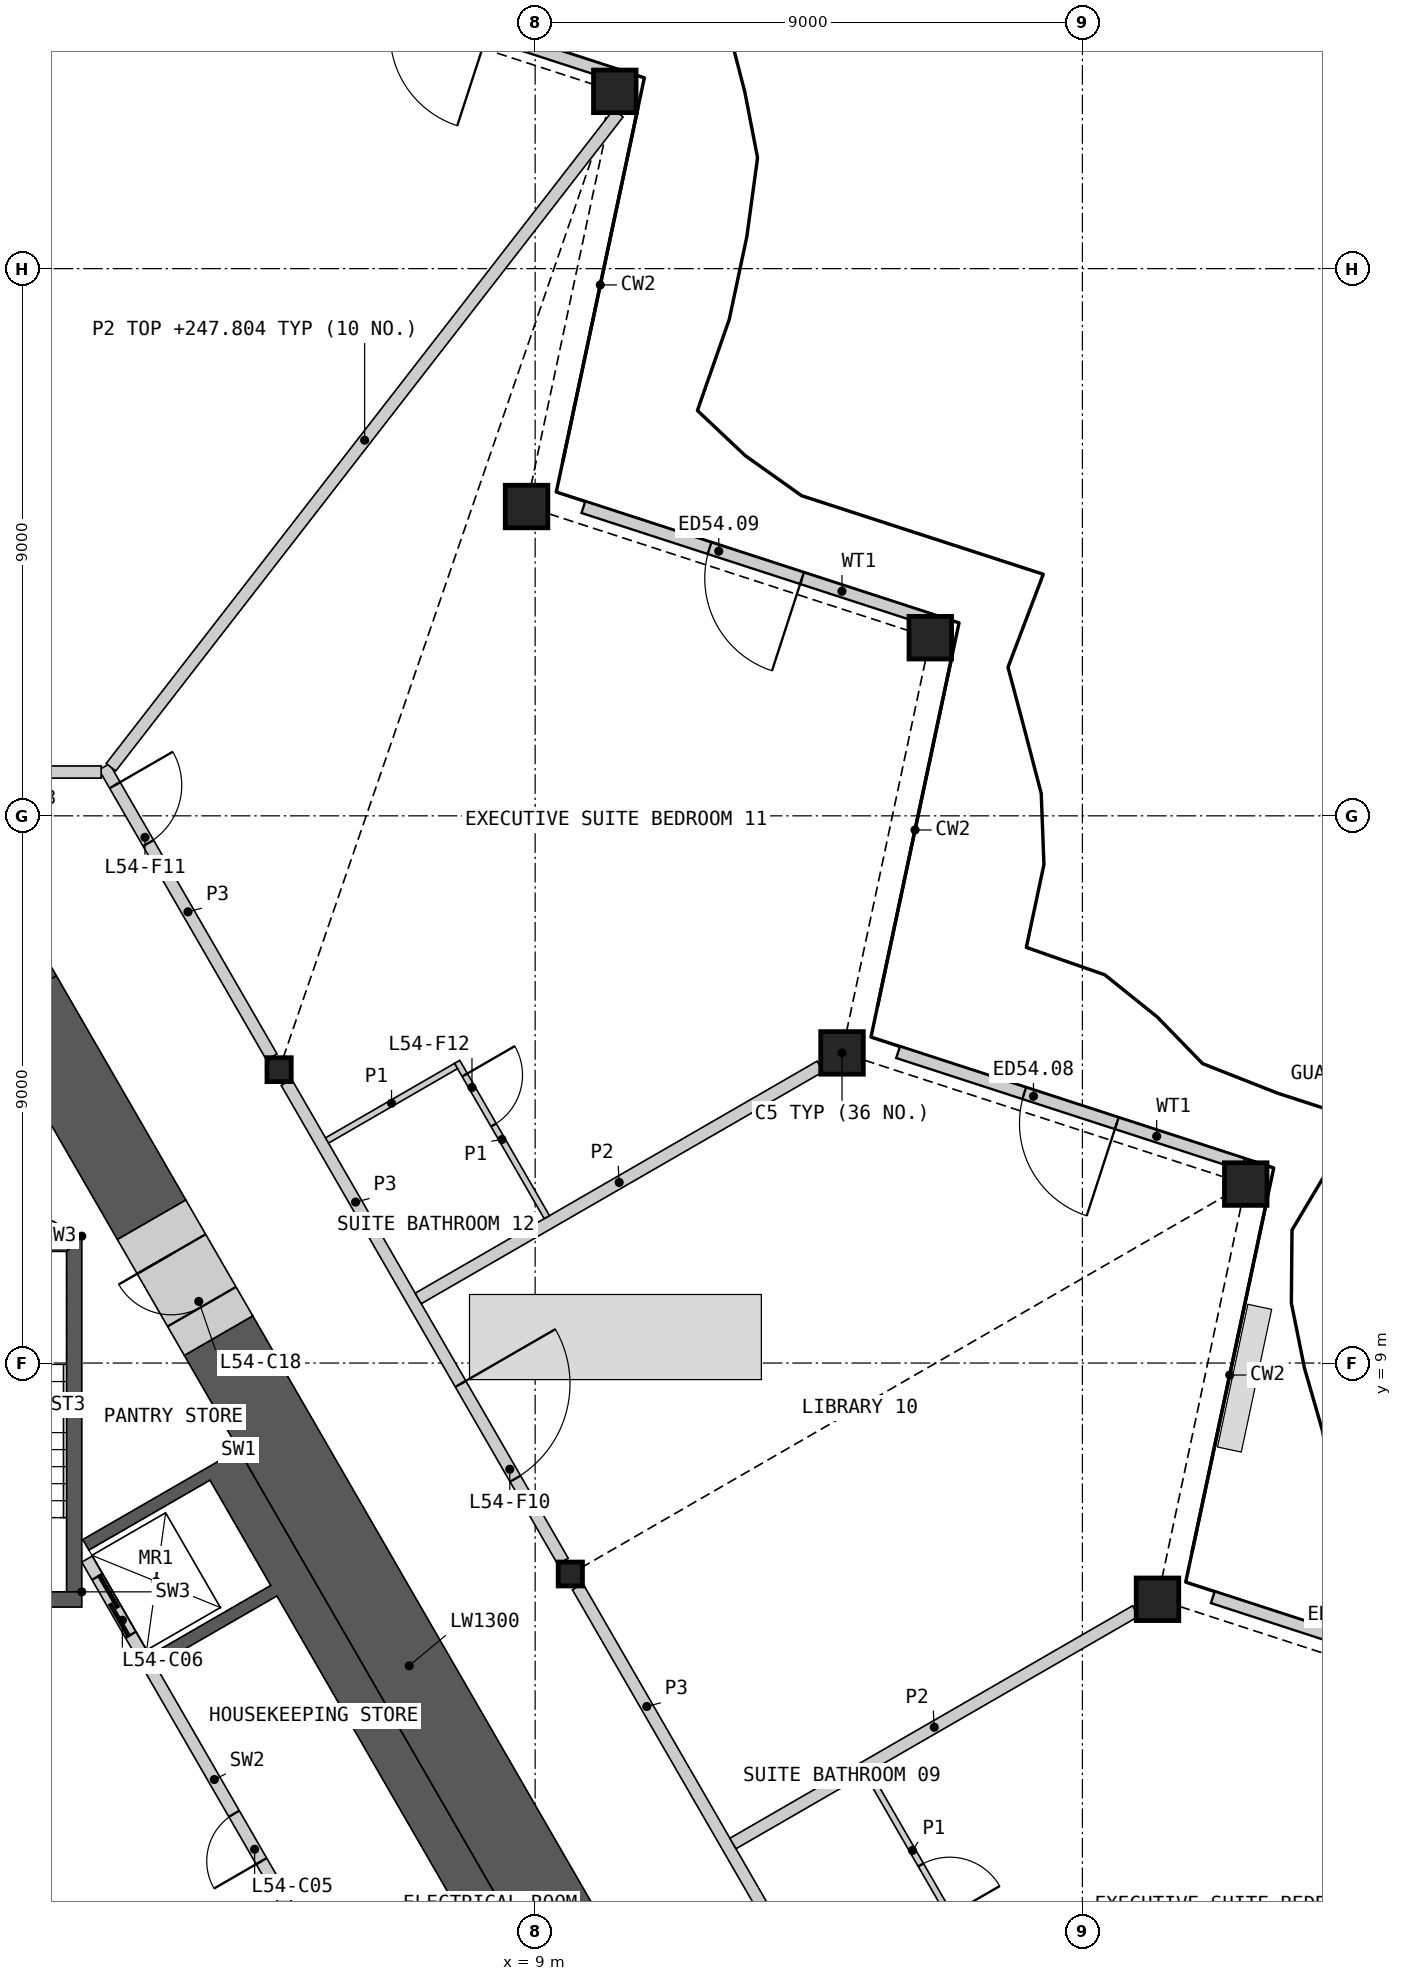
"""IFC4 building model, lengths in metres.
Left out: names, types, materials, properties, quantities, classifications, styles, units other than length and angle.
Written with IfcOpenShell. Run it as: python <this file> out.ifc"""

import sys

from ifc_helpers import new_model, si_unit, direction, frame, frame_2d, origin, origin_2d, place, context, subcontext, project, spatial, polyline, rectangle, hollow_rectangle, i_section, outline, extrude, element, fill, save


model = new_model("IFC4")
c1 = context("Model", 3, precision=1e-05, world=origin(), true_north=direction((0.0, 1.0)))
c2 = subcontext(c1, "Body", "Model", "MODEL_VIEW")
j1 = project(units=[si_unit("LENGTHUNIT", "METRE"), si_unit("PLANEANGLEUNIT", "RADIAN")], contexts=[c1])
p1 = place(None, origin())
s1 = spatial("IfcSite", under=j1, at=p1, CompositionType="ELEMENT")
p2 = place(p1, origin())
s2 = spatial("IfcBuilding", under=s1, at=p2, CompositionType="ELEMENT")
p3 = place(p2, frame((0.0, 0.0, 245.4)))
s3 = spatial("IfcBuildingStorey", under=s2, at=p3, CompositionType="ELEMENT", Elevation=245.4)
for number, where, z_axis, x_axis in (
    (1, (19.235, 5.115, 0.0), (0.0, 0.0, 1.0), (1.0, 0.0, 0.0)),
    (2, (20.687, 11.943, 0.0), (0.0, 0.0, 1.0), (1.0, 0.0, 0.0)),
    (3, (14.047, 14.101, 0.0), (0.0, 0.0, 1.0), (1.0, 0.0, 0.0)),
    (4, (15.499, 20.93, 0.0), (0.0, 0.0, 1.0), (1.0, 0.0, 0.0)),
    (5, (8.859, 23.087, 0.0), (0.0, 0.0, 1.0), (1.0, 0.0, 0.0)),
    (6, (10.31, 29.916, 0.0), (0.0, 0.0, 1.0), (1.0, 0.0, 0.0)),
):
    element("IfcColumn", number, at=place(p3, frame(where, z_axis=z_axis, x_axis=x_axis)), inside=s3, PredefinedType="COLUMN", context=c2, shape_type="SweptSolid", body=[
        extrude(hollow_rectangle(XDim=0.7, YDim=0.7, WallThickness=0.045, at=origin_2d()), origin(), (0.0, 0.0, 1.0), 3.6),
    ])
for number, where, z_axis, x_axis in (
    (7, (9.578, 5.53, 0.0), (0.0, 0.0, 1.0), (1.0, 0.0, 0.0)),
    (8, (4.789, 13.825, 0.0), (0.0, 0.0, 1.0), (1.0, 0.0, 0.0)),
):
    element("IfcColumn", number, at=place(p3, frame(where, z_axis=z_axis, x_axis=x_axis)), inside=s3, PredefinedType="COLUMN", context=c2, shape_type="SweptSolid", body=[
        extrude(i_section(OverallWidth=0.399, OverallDepth=0.393, WebThickness=0.023, FlangeThickness=0.037, at=origin_2d()), origin(), (0.0, 0.0, 1.0), 3.6),
    ])
p4 = place(p3, frame((25.815, 3.304, 0.0), z_axis=(0.0, 0.0, 1.0), x_axis=(-0.951055430656, 0.309020335608, 0.0)))
e9 = element("IfcWall", 9, at=p4, inside=s3, PredefinedType="SOLIDWALL", context=c2, shape_type="SweptSolid", body=[
    extrude(rectangle(XDim=5.962, YDim=0.2, at=frame_2d((2.981, 0.0))), origin(), (0.0, 0.0, 1.0), 2.701),
])
p5 = place(p4, frame((2.181, 0.0, 0.0)))
e10 = element("IfcOpeningElement", 10, at=p5, cuts=e9, PredefinedType="OPENING", context=c2, shape_type="SweptSolid", body=[
    extrude(rectangle(XDim=1.6, YDim=2.4, at=frame_2d((0.8, 1.2))), frame((0.0, 0.11, 0.0), z_axis=(0.0, -1.0, 0.0), x_axis=(1.0, 0.0, 0.0)), (0.0, 0.0, 1.0), 0.22),
])
p6 = place(p3, frame((20.64, 12.269, 0.0), z_axis=(0.0, 0.0, 1.0), x_axis=(-0.95104730696, 0.309045336358, 0.0)))
e11 = element("IfcWall", 11, at=p6, inside=s3, PredefinedType="SOLIDWALL", context=c2, shape_type="SweptSolid", body=[
    extrude(rectangle(XDim=5.963, YDim=0.2, at=frame_2d((2.981, 0.0))), origin(), (0.0, 0.0, 1.0), 2.701),
])
p7 = place(p6, frame((2.181, 0.0, 0.0)))
e12 = element("IfcOpeningElement", 12, at=p7, cuts=e11, PredefinedType="OPENING", context=c2, shape_type="SweptSolid", body=[
    extrude(rectangle(XDim=1.6, YDim=2.4, at=frame_2d((0.8, 1.2))), frame((0.0, 0.11, 0.0), z_axis=(0.0, -1.0, 0.0), x_axis=(1.0, 0.0, 0.0)), (0.0, 0.0, 1.0), 0.22),
])
p8 = place(p3, frame((15.464, 21.233, 0.0), z_axis=(0.0, 0.0, 1.0), x_axis=(-0.951055430656, 0.309020335608, 0.0)))
e13 = element("IfcWall", 13, at=p8, inside=s3, PredefinedType="SOLIDWALL", context=c2, shape_type="SweptSolid", body=[
    extrude(rectangle(XDim=5.962, YDim=0.2, at=frame_2d((2.981, 0.0))), origin(), (0.0, 0.0, 1.0), 2.701),
])
p9 = place(p8, frame((2.181, 0.0, 0.0)))
e14 = element("IfcOpeningElement", 14, at=p9, cuts=e13, PredefinedType="OPENING", context=c2, shape_type="SweptSolid", body=[
    extrude(rectangle(XDim=1.6, YDim=2.4, at=frame_2d((0.8, 1.2))), frame((0.0, 0.11, 0.0), z_axis=(0.0, -1.0, 0.0), x_axis=(1.0, 0.0, 0.0)), (0.0, 0.0, 1.0), 0.22),
])
p10 = place(p3, frame((10.288, 30.198, 0.0), z_axis=(0.0, 0.0, 1.0), x_axis=(-0.951055430656, 0.309020335608, 0.0)))
e15 = element("IfcWall", 15, at=p10, inside=s3, PredefinedType="SOLIDWALL", context=c2, shape_type="SweptSolid", body=[
    extrude(rectangle(XDim=5.962, YDim=0.2, at=frame_2d((2.981, 0.0))), origin(), (0.0, 0.0, 1.0), 2.701),
])
p11 = place(p10, frame((2.181, 0.0, 0.0)))
e16 = element("IfcOpeningElement", 16, at=p11, cuts=e15, PredefinedType="OPENING", context=c2, shape_type="SweptSolid", body=[
    extrude(rectangle(XDim=1.6, YDim=2.4, at=frame_2d((0.8, 1.2))), frame((0.0, 0.11, 0.0), z_axis=(0.0, -1.0, 0.0), x_axis=(1.0, 0.0, 0.0)), (0.0, 0.0, 1.0), 0.22),
])
p12 = place(p3, origin())
e17 = element("IfcWall", 17, at=p12, inside=s3, PredefinedType="SHEAR", context=c2, shape_type="SweptSolid", body=[
    extrude(outline(polyline([(4.124, 7.577), (8.624, -0.217), (8.231, -0.444), (6.061, -1.697), (5.96, -1.524), (7.952, -0.374), (4.752, 5.169), (2.76, 4.019), (2.66, 4.192), (4.652, 5.342), (3.652, 7.074), (1.66, 5.924), (1.561, 6.097), (3.731, 7.35), (4.124, 7.577)])), origin(), (0.0, 0.0, 1.0), 3.25),
])
p13 = place(p3, frame((5.817, -1.476, 0.0), z_axis=(0.0, 0.0, 1.0), x_axis=(-0.500002616675, 0.866023893041, 0.0)))
e18 = element("IfcWall", 18, at=p13, inside=s3, PredefinedType="SOLIDWALL", context=c2, shape_type="SweptSolid", body=[
    extrude(rectangle(XDim=8.373, YDim=0.2, at=frame_2d((4.187, 0.0))), origin(), (0.0, 0.0, 1.0), 3.25),
])
p14 = place(p13, frame((2.637, 0.0, 0.0)))
e19 = element("IfcOpeningElement", 19, at=p14, cuts=e18, PredefinedType="OPENING", context=c2, shape_type="SweptSolid", body=[
    extrude(rectangle(XDim=0.9, YDim=2.1, at=frame_2d((0.45, 1.05))), frame((0.0, 0.11, 0.0), z_axis=(0.0, -1.0, 0.0), x_axis=(1.0, 0.0, 0.0)), (0.0, 0.0, 1.0), 0.22),
])
p15 = place(p13, frame((6.937, 0.0, 0.0)))
e20 = element("IfcOpeningElement", 20, at=p15, cuts=e18, PredefinedType="OPENING", context=c2, shape_type="SweptSolid", body=[
    extrude(rectangle(XDim=1.1, YDim=2.1, at=frame_2d((0.55, 1.05))), frame((0.0, 0.11, 0.0), z_axis=(0.0, -1.0, 0.0), x_axis=(1.0, 0.0, 0.0)), (0.0, 0.0, 1.0), 0.22),
])
p16 = place(p3, origin())
e21 = element("IfcWall", 21, at=p16, inside=s3, PredefinedType="SHEAR", context=c2, shape_type="SweptSolid", body=[
    extrude(outline(polyline([(1.544, 5.237), (1.544, 11.087), (1.294, 10.837), (1.294, 5.237), (1.544, 5.237)])), origin(), (0.0, 0.0, 1.0), 3.25),
])
p17 = place(p3, origin())
e22 = element("IfcWall", 22, at=p17, inside=s3, PredefinedType="SHEAR", context=c2, shape_type="SweptSolid", body=[
    extrude(outline(polyline([(1.544, 11.087), (-1.544, 11.087), (-1.294, 10.837), (1.294, 10.837), (1.544, 11.087)])), origin(), (0.0, 0.0, 1.0), 3.25),
])
p18 = place(p3, frame((1.544, 5.112, 0.0), z_axis=(0.0, 0.0, 1.0), x_axis=(-1.0, 0.0, 0.0)))
e23 = element("IfcWall", 23, at=p18, inside=s3, PredefinedType="SHEAR", context=c2, shape_type="SweptSolid", body=[
    extrude(rectangle(XDim=3.088, YDim=0.25, at=frame_2d((1.544, 0.0))), origin(), (0.0, 0.0, 1.0), 3.25),
])
p19 = place(p18, frame((0.994, 0.0, 0.0)))
e24 = element("IfcOpeningElement", 24, at=p19, cuts=e23, PredefinedType="OPENING", context=c2, shape_type="SweptSolid", body=[
    extrude(rectangle(XDim=1.1, YDim=2.1, at=frame_2d((0.55, 1.05))), frame((0.0, 0.135, 0.0), z_axis=(0.0, -1.0, 0.0), x_axis=(1.0, 0.0, 0.0)), (0.0, 0.0, 1.0), 0.27),
])
p20 = place(p3, frame((-1.237, 12.578, 0.0), z_axis=(0.0, 0.0, 1.0), x_axis=(0.866045649925, -0.499964931016, 0.0)))
e25 = element("IfcWall", 25, at=p20, inside=s3, PredefinedType="PARTITIONING", context=c2, shape_type="SweptSolid", body=[
    extrude(rectangle(XDim=2.992, YDim=0.15, at=frame_2d((1.496, 0.0))), origin(), (0.0, 0.0, 1.0), 3.25),
])
p21 = place(p3, frame((10.062, -1.408, 0.0), z_axis=(0.0, 0.0, 1.0), x_axis=(-0.500000545805, 0.866025088663, 0.0)))
e26 = element("IfcWall", 26, at=p21, inside=s3, PredefinedType="SHEAR", context=c2, shape_type="SweptSolid", body=[
    extrude(rectangle(XDim=12.539, YDim=1.3, at=frame_2d((6.27, 0.0))), origin(), (0.0, 0.0, 1.0), 3.25),
])
p22 = place(p3, frame((2.693, 11.356, 0.0), z_axis=(0.0, 0.0, 1.0), x_axis=(-0.50002837164, 0.866009022791, 0.0)))
e27 = element("IfcWall", 27, at=p22, inside=s3, PredefinedType="SHEAR", context=c2, shape_type="SweptSolid", body=[
    extrude(rectangle(XDim=4.26, YDim=1.3, at=frame_2d((2.13, 0.0))), origin(), (0.0, 0.0, 1.0), 3.25),
])
p23 = place(p3, origin())
e28 = element("IfcWall", 28, at=p23, inside=s3, PredefinedType="SHEAR", context=c2, shape_type="SweptSolid", body=[
    extrude(outline(polyline([(-1.126, 15.371), (0.0, 17.321), (1.126, 15.371), (0.0, 14.72), (-1.126, 15.371)])), origin(), (0.0, 0.0, 1.0), 3.25),
])
p24 = place(p3, frame((3.793, 9.451, 0.0), z_axis=(0.0, 0.0, 1.0), x_axis=(-0.499946605688, 0.86605622881, 0.0)))
e29 = element("IfcWall", 29, at=p24, inside=s3, PredefinedType="SHEAR", context=c2, shape_type="SweptSolid", body=[
    extrude(rectangle(XDim=2.2, YDim=1.3, at=frame_2d((1.1, 0.0))), origin(), (0.0, 0.0, 1.0), 3.25),
])
p25 = place(p24, frame((0.55, 0.0, 0.0)))
e30 = element("IfcOpeningElement", 30, at=p25, cuts=e29, PredefinedType="OPENING", context=c2, shape_type="SweptSolid", body=[
    extrude(rectangle(XDim=1.0, YDim=2.1, at=frame_2d((0.5, 1.05))), frame((0.0, 0.66, 0.0), z_axis=(0.0, -1.0, 0.0), x_axis=(1.0, 0.0, 0.0)), (0.0, 0.0, 1.0), 1.32),
])
p26 = place(p3, frame((9.699, 5.321, 0.0), z_axis=(0.0, 0.0, 1.0), x_axis=(0.49998193945, -0.866035830797, 0.0)))
e31 = element("IfcWall", 31, at=p26, inside=s3, PredefinedType="PARTITIONING", context=c2, shape_type="SweptSolid", body=[
    extrude(rectangle(XDim=9.094, YDim=0.2, at=frame_2d((4.547, 0.0))), origin(), (0.0, 0.0, 1.0), 3.25),
])
p27 = place(p3, frame((4.91, 13.616, 0.0), z_axis=(0.0, 0.0, 1.0), x_axis=(0.50000207303, -0.866024206917, 0.0)))
e32 = element("IfcWall", 32, at=p27, inside=s3, PredefinedType="PARTITIONING", context=c2, shape_type="SweptSolid", body=[
    extrude(rectangle(XDim=9.095, YDim=0.2, at=frame_2d((4.547, 0.0))), origin(), (0.0, 0.0, 1.0), 3.25),
])
p28 = place(p27, frame((5.726, 0.0, 0.0)))
e33 = element("IfcOpeningElement", 33, at=p28, cuts=e32, PredefinedType="OPENING", context=c2, shape_type="SweptSolid", body=[
    extrude(rectangle(XDim=1.8, YDim=2.1, at=frame_2d((0.9, 1.05))), frame((0.0, 0.11, 0.0), z_axis=(0.0, -1.0, 0.0), x_axis=(1.0, 0.0, 0.0)), (0.0, 0.0, 1.0), 0.22),
])
p29 = place(p3, frame((1.913, 18.807, 0.0), z_axis=(0.0, 0.0, 1.0), x_axis=(0.499984524817, -0.866034338201, 0.0)))
e34 = element("IfcWall", 34, at=p29, inside=s3, PredefinedType="PARTITIONING", context=c2, shape_type="SweptSolid", body=[
    extrude(rectangle(XDim=5.51, YDim=0.2, at=frame_2d((2.755, 0.0))), origin(), (0.0, 0.0, 1.0), 3.25),
])
p30 = place(p29, frame((0.35, 0.0, 0.0)))
e35 = element("IfcOpeningElement", 35, at=p30, cuts=e34, PredefinedType="OPENING", context=c2, shape_type="SweptSolid", body=[
    extrude(rectangle(XDim=1.1, YDim=2.1, at=frame_2d((0.55, 1.05))), frame((0.0, 0.11, 0.0), z_axis=(0.0, -1.0, 0.0), x_axis=(1.0, 0.0, 0.0)), (0.0, 0.0, 1.0), 0.22),
])
p31 = place(p3, frame((-1.863, 18.72, 0.0), z_axis=(0.0, 0.0, 1.0), x_axis=(1.0, 0.0, 0.0)))
e36 = element("IfcWall", 36, at=p31, inside=s3, PredefinedType="PARTITIONING", context=c2, shape_type="SweptSolid", body=[
    extrude(rectangle(XDim=3.726, YDim=0.2, at=frame_2d((1.863, 0.0))), origin(), (0.0, 0.0, 1.0), 3.25),
])
p32 = place(p31, frame((0.963, 0.0, 0.0)))
e37 = element("IfcOpeningElement", 37, at=p32, cuts=e36, PredefinedType="OPENING", context=c2, shape_type="SweptSolid", body=[
    extrude(rectangle(XDim=1.8, YDim=2.1, at=frame_2d((0.9, 1.05))), frame((0.0, 0.11, 0.0), z_axis=(0.0, -1.0, 0.0), x_axis=(1.0, 0.0, 0.0)), (0.0, 0.0, 1.0), 0.22),
])
p33 = place(p3, frame((2.024, 18.8, 0.0), z_axis=(0.0, 0.0, 1.0), x_axis=(0.612908308889, 0.790154038713, 0.0)))
e38 = element("IfcWall", 38, at=p33, inside=s3, PredefinedType="PARTITIONING", context=c2, shape_type="SweptSolid", body=[
    extrude(rectangle(XDim=13.613, YDim=0.2, at=frame_2d((6.807, 0.0))), origin(), (0.0, 0.0, 1.0), 2.404),
])
p34 = place(p3, frame((12.253, 1.098, 0.0), z_axis=(0.0, 0.0, 1.0), x_axis=(0.866026077102, 0.499998833779, 0.0)))
e39 = element("IfcWall", 39, at=p34, inside=s3, PredefinedType="PARTITIONING", context=c2, shape_type="SweptSolid", body=[
    extrude(rectangle(XDim=7.646, YDim=0.2, at=frame_2d((3.823, 0.0))), origin(), (0.0, 0.0, 1.0), 2.404),
])
p35 = place(p3, frame((7.077, 10.062, 0.0), z_axis=(0.0, 0.0, 1.0), x_axis=(0.866041764179, 0.499971661894, 0.0)))
e40 = element("IfcWall", 40, at=p35, inside=s3, PredefinedType="PARTITIONING", context=c2, shape_type="SweptSolid", body=[
    extrude(rectangle(XDim=7.632, YDim=0.2, at=frame_2d((3.816, 0.0))), origin(), (0.0, 0.0, 1.0), 2.404),
])
p36 = place(p3, frame((14.468, 2.261, 0.0), z_axis=(0.0, 0.0, 1.0), x_axis=(0.500037662692, -0.866003658127, 0.0)))
e41 = element("IfcWall", 41, at=p36, inside=s3, PredefinedType="PARTITIONING", context=c2, shape_type="SweptSolid", body=[
    extrude(rectangle(XDim=2.95, YDim=0.1, at=frame_2d((1.475, 0.0))), origin(), (0.0, 0.0, 1.0), 2.404),
])
p37 = place(p36, frame((1.75, 0.0, 0.0)))
e42 = element("IfcOpeningElement", 42, at=p37, cuts=e41, PredefinedType="OPENING", context=c2, shape_type="SweptSolid", body=[
    extrude(rectangle(XDim=0.95, YDim=2.1, at=frame_2d((0.475, 1.05))), frame((0.0, 0.06, 0.0), z_axis=(0.0, -1.0, 0.0), x_axis=(1.0, 0.0, 0.0)), (0.0, 0.0, 1.0), 0.12),
])
p38 = place(p3, frame((7.717, 13.954, 0.0), z_axis=(0.0, 0.0, 1.0), x_axis=(0.500001826776, -0.866024349092, 0.0)))
e43 = element("IfcWall", 43, at=p38, inside=s3, PredefinedType="PARTITIONING", context=c2, shape_type="SweptSolid", body=[
    extrude(rectangle(XDim=2.95, YDim=0.1, at=frame_2d((1.475, 0.0))), origin(), (0.0, 0.0, 1.0), 2.404),
])
p39 = place(p38, frame((0.25, 0.0, 0.0)))
e44 = element("IfcOpeningElement", 44, at=p39, cuts=e43, PredefinedType="OPENING", context=c2, shape_type="SweptSolid", body=[
    extrude(rectangle(XDim=0.95, YDim=2.1, at=frame_2d((0.475, 1.05))), frame((0.0, 0.06, 0.0), z_axis=(0.0, -1.0, 0.0), x_axis=(1.0, 0.0, 0.0)), (0.0, 0.0, 1.0), 0.12),
])
p40 = place(p3, frame((5.577, 12.66, 0.0), z_axis=(0.0, 0.0, 1.0), x_axis=(0.866014668023, 0.500018594424, 0.0)))
e45 = element("IfcWall", 45, at=p40, inside=s3, PredefinedType="PARTITIONING", context=c2, shape_type="SweptSolid", body=[
    extrude(rectangle(XDim=2.45, YDim=0.1, at=frame_2d((1.225, 0.0))), origin(), (0.0, 0.0, 1.0), 2.404),
])
p41 = place(p7, origin())
e46 = element("IfcDoor", 46, at=p41, inside=s3, OperationType="DOUBLE_DOOR_SINGLE_SWING", PredefinedType="DOOR", context=c2, shape_type="SweptSolid", body=[
    extrude(rectangle(XDim=1.6, YDim=2.4, at=frame_2d((0.8, 1.2))), frame((0.0, 0.025, 0.0), z_axis=(0.0, -1.0, 0.0), x_axis=(1.0, 0.0, 0.0)), (0.0, 0.0, 1.0), 0.05),
])
fill(e12, e46)
p42 = place(p9, origin())
e47 = element("IfcDoor", 47, at=p42, inside=s3, OperationType="DOUBLE_DOOR_SINGLE_SWING", PredefinedType="DOOR", context=c2, shape_type="SweptSolid", body=[
    extrude(rectangle(XDim=1.6, YDim=2.4, at=frame_2d((0.8, 1.2))), frame((0.0, 0.025, 0.0), z_axis=(0.0, -1.0, 0.0), x_axis=(1.0, 0.0, 0.0)), (0.0, 0.0, 1.0), 0.05),
])
fill(e14, e47)
p43 = place(p14, origin())
e48 = element("IfcDoor", 48, at=p43, inside=s3, OperationType="SINGLE_SWING_LEFT", PredefinedType="DOOR", context=c2, shape_type="SweptSolid", body=[
    extrude(rectangle(XDim=0.9, YDim=2.1, at=frame_2d((0.45, 1.05))), frame((0.0, 0.025, 0.0), z_axis=(0.0, -1.0, 0.0), x_axis=(1.0, 0.0, 0.0)), (0.0, 0.0, 1.0), 0.05),
])
fill(e19, e48)
p44 = place(p15, origin())
e49 = element("IfcDoor", 49, at=p44, inside=s3, OperationType="SLIDING_TO_LEFT", PredefinedType="DOOR", context=c2, shape_type="SweptSolid", body=[
    extrude(rectangle(XDim=1.1, YDim=2.1, at=frame_2d((0.55, 1.05))), frame((0.0, 0.025, 0.0), z_axis=(0.0, -1.0, 0.0), x_axis=(1.0, 0.0, 0.0)), (0.0, 0.0, 1.0), 0.05),
])
fill(e20, e49)
p45 = place(p25, origin())
e50 = element("IfcDoor", 50, at=p45, inside=s3, OperationType="SINGLE_SWING_RIGHT", PredefinedType="DOOR", context=c2, shape_type="SweptSolid", body=[
    extrude(rectangle(XDim=1.0, YDim=2.1, at=frame_2d((0.5, 1.05))), frame((0.0, 0.405, 0.0), z_axis=(0.0, -1.0, 0.0), x_axis=(1.0, 0.0, 0.0)), (0.0, 0.0, 1.0), 0.05),
])
fill(e30, e50)
p46 = place(p37, origin())
e51 = element("IfcDoor", 51, at=p46, inside=s3, OperationType="SINGLE_SWING_RIGHT", PredefinedType="DOOR", context=c2, shape_type="SweptSolid", body=[
    extrude(rectangle(XDim=0.95, YDim=2.1, at=frame_2d((0.475, 1.05))), frame((0.0, 0.025, 0.0), z_axis=(0.0, -1.0, 0.0), x_axis=(1.0, 0.0, 0.0)), (0.0, 0.0, 1.0), 0.05),
])
fill(e42, e51)
p47 = place(p28, origin())
e52 = element("IfcDoor", 52, at=p47, inside=s3, OperationType="DOUBLE_DOOR_SINGLE_SWING", PredefinedType="DOOR", context=c2, shape_type="SweptSolid", body=[
    extrude(rectangle(XDim=1.8, YDim=2.1, at=frame_2d((0.9, 1.05))), frame((0.0, 0.025, 0.0), z_axis=(0.0, -1.0, 0.0), x_axis=(1.0, 0.0, 0.0)), (0.0, 0.0, 1.0), 0.05),
])
fill(e33, e52)
p48 = place(p30, origin())
e53 = element("IfcDoor", 53, at=p48, inside=s3, OperationType="SINGLE_SWING_LEFT", PredefinedType="DOOR", context=c2, shape_type="SweptSolid", body=[
    extrude(rectangle(XDim=1.1, YDim=2.1, at=frame_2d((0.55, 1.05))), frame((0.0, 0.025, 0.0), z_axis=(0.0, -1.0, 0.0), x_axis=(1.0, 0.0, 0.0)), (0.0, 0.0, 1.0), 0.05),
])
fill(e35, e53)
p49 = place(p39, origin())
e54 = element("IfcDoor", 54, at=p49, inside=s3, OperationType="SINGLE_SWING_LEFT", PredefinedType="DOOR", context=c2, shape_type="SweptSolid", body=[
    extrude(rectangle(XDim=0.95, YDim=2.1, at=frame_2d((0.475, 1.05))), frame((0.0, 0.025, 0.0), z_axis=(0.0, -1.0, 0.0), x_axis=(1.0, 0.0, 0.0)), (0.0, 0.0, 1.0), 0.05),
])
fill(e44, e54)
save(model, sys.argv[1])
